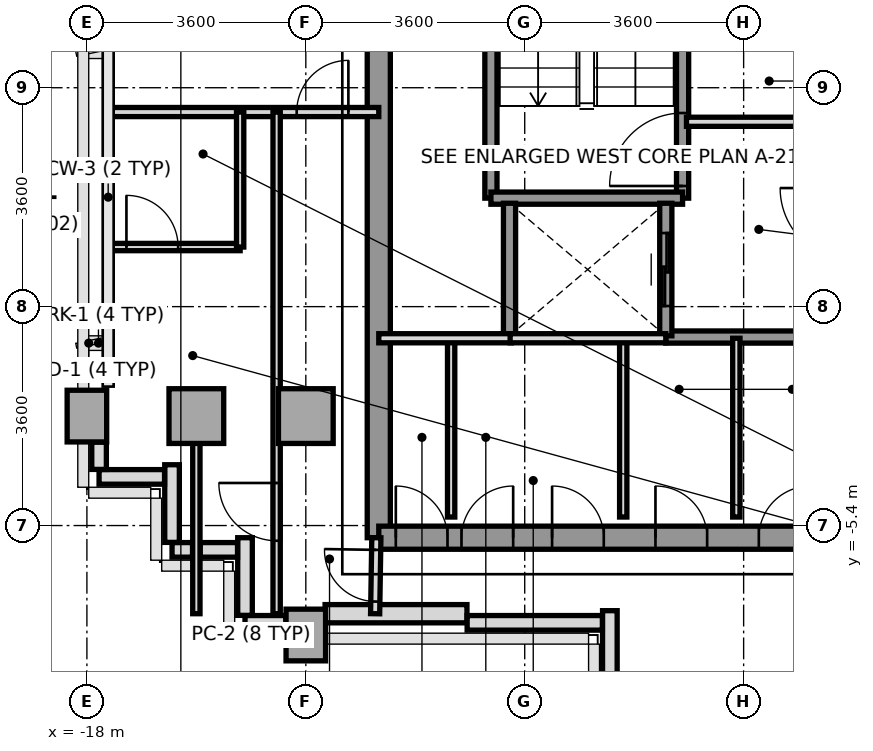
"""IFC4 building model, lengths in metres.
Left out: names, types, materials, properties, quantities, classifications, styles, units other than length and angle.
Written with IfcOpenShell. Run it as: python <this file> out.ifc"""

import sys

from ifc_helpers import new_model, si_unit, direction, frame, frame_2d, origin, origin_2d, place, context, subcontext, project, spatial, rectangle, extrude, source, transform, mapped, element, fill, save


model = new_model("IFC4")
c1 = context("Model", 3, precision=1e-05, world=origin(), true_north=direction((0.0, 1.0)))
c2 = subcontext(c1, "Body", "Model", "MODEL_VIEW")
j1 = project(units=[si_unit("LENGTHUNIT", "METRE"), si_unit("PLANEANGLEUNIT", "RADIAN")], contexts=[c1])
p1 = place(None, origin())
s1 = spatial("IfcSite", under=j1, at=p1, CompositionType="ELEMENT")
p2 = place(p1, origin())
s2 = spatial("IfcBuilding", under=s1, at=p2, CompositionType="ELEMENT")
p3 = place(p2, frame((0.0, 0.0, 191.0)))
s3 = spatial("IfcBuildingStorey", under=s2, at=p3, CompositionType="ELEMENT", Elevation=191.0)
m1 = source(origin(), c2, "Body", "SweptSolid", [
    extrude(rectangle(XDim=0.65, YDim=0.85, at=origin_2d()), origin(), (0.0, 0.0, 1.0), 3.2),
])
p4 = place(p3, frame((-18.0, -3.6, 0.0), z_axis=(0.0, 0.0, 1.0), x_axis=(1.0, 0.0, 0.0)))
e1 = element("IfcColumn", 1, at=p4, inside=s3, PredefinedType="COLUMN", context=c2, shape_type="MappedRepresentation", body=[
    mapped(m1, transform((0.0, 0.0, 0.0), x_axis=(1.0, 0.0, 0.0), y_axis=(0.0, 1.0, 0.0), z_axis=(0.0, 0.0, 1.0), scale=1.0)),
])
m2 = source(origin(), c2, "Body", "SweptSolid", [
    extrude(rectangle(XDim=0.9, YDim=0.9, at=origin_2d()), origin(), (0.0, 0.0, 1.0), 3.2),
])
p5 = place(p3, frame((-16.2, -3.6, 0.0), z_axis=(0.0, 0.0, 1.0), x_axis=(1.0, 0.0, 0.0)))
e2 = element("IfcColumn", 2, at=p5, inside=s3, PredefinedType="COLUMN", context=c2, shape_type="MappedRepresentation", body=[
    mapped(m2, transform((0.0, 0.0, 0.0), x_axis=(1.0, 0.0, 0.0), y_axis=(0.0, 1.0, 0.0), z_axis=(0.0, 0.0, 1.0), scale=1.0)),
])
p6 = place(p3, frame((-14.4, -7.2, 0.0), z_axis=(0.0, 0.0, 1.0), x_axis=(1.0, 0.0, 0.0)))
e3 = element("IfcColumn", 3, at=p6, inside=s3, PredefinedType="COLUMN", context=c2, shape_type="MappedRepresentation", body=[
    mapped(m1, transform((0.0, 0.0, 0.0), x_axis=(1.0, 0.0, 0.0), y_axis=(0.0, 1.0, 0.0), z_axis=(0.0, 0.0, 1.0), scale=1.0)),
])
p7 = place(p3, frame((-14.4, -3.6, 0.0), z_axis=(0.0, 0.0, 1.0), x_axis=(1.0, 0.0, 0.0)))
e4 = element("IfcColumn", 4, at=p7, inside=s3, PredefinedType="COLUMN", context=c2, shape_type="MappedRepresentation", body=[
    mapped(m2, transform((0.0, 0.0, 0.0), x_axis=(1.0, 0.0, 0.0), y_axis=(0.0, 1.0, 0.0), z_axis=(0.0, 0.0, 1.0), scale=1.0)),
])
p8 = place(p3, frame((-14.083, -6.85, 0.0), z_axis=(0.0, 0.0, 1.0), x_axis=(1.0, 0.0, 0.0)))
e5 = element("IfcWall", 5, at=p8, inside=s3, PredefinedType="SOLIDWALL", context=c2, shape_type="SweptSolid", body=[
    extrude(rectangle(XDim=2.333, YDim=0.3, at=frame_2d((1.167, 0.0))), origin(), (0.0, 0.0, 1.0), 3.2),
])
p9 = place(p3, frame((-9.4, -8.547, 0.0), z_axis=(0.0, 0.0, 1.0), x_axis=(0.0, 1.0, 0.0)))
e6 = element("IfcWall", 6, at=p9, inside=s3, PredefinedType="PARAPET", context=c2, shape_type="SweptSolid", body=[
    extrude(rectangle(XDim=1.747, YDim=0.24, at=frame_2d((0.874, 0.0))), origin(), (0.0, 0.0, 1.0), 1.15),
])
p10 = place(p3, frame((-9.523, -7.0, 0.0), z_axis=(0.0, 0.0, 1.0), x_axis=(-1.0, 0.0, 0.0)))
e7 = element("IfcWall", 7, at=p10, inside=s3, PredefinedType="PARAPET", context=c2, shape_type="SweptSolid", body=[
    extrude(rectangle(XDim=2.224, YDim=0.24, at=frame_2d((1.112, 0.0))), origin(), (0.0, 0.0, 1.0), 1.15),
])
p11 = place(p3, frame((-14.728, -7.0, 0.0), z_axis=(0.0, 0.0, 1.0), x_axis=(-1.0, 0.0, 0.0)))
e8 = element("IfcWall", 8, at=p11, inside=s3, PredefinedType="PARAPET", context=c2, shape_type="SweptSolid", body=[
    extrude(rectangle(XDim=0.672, YDim=0.24, at=frame_2d((0.336, 0.0))), origin(), (0.0, 0.0, 1.0), 1.15),
])
p12 = place(p3, frame((-15.4, -6.877, 0.0), z_axis=(0.0, 0.0, 1.0), x_axis=(0.0, 1.0, 0.0)))
e9 = element("IfcWall", 9, at=p12, inside=s3, PredefinedType="PARAPET", context=c2, shape_type="SweptSolid", body=[
    extrude(rectangle(XDim=1.277, YDim=0.24, at=frame_2d((0.638, 0.0))), origin(), (0.0, 0.0, 1.0), 1.15),
])
p13 = place(p3, frame((-15.523, -5.8, 0.0), z_axis=(0.0, 0.0, 1.0), x_axis=(-1.0, 0.0, 0.0)))
e10 = element("IfcWall", 10, at=p13, inside=s3, PredefinedType="PARAPET", context=c2, shape_type="SweptSolid", body=[
    extrude(rectangle(XDim=0.614, YDim=0.24, at=frame_2d((0.307, 0.0))), origin(), (0.0, 0.0, 1.0), 1.15),
])
p14 = place(p3, frame((-16.263, -5.8, 0.0), z_axis=(0.0, 0.0, 1.0), x_axis=(-1.0, 0.0, 0.0)))
e11 = element("IfcWall", 11, at=p14, inside=s3, PredefinedType="PARAPET", context=c2, shape_type="SweptSolid", body=[
    extrude(rectangle(XDim=0.337, YDim=0.24, at=frame_2d((0.168, 0.0))), origin(), (0.0, 0.0, 1.0), 1.15),
])
p15 = place(p3, frame((-16.6, -5.677, 0.0), z_axis=(0.0, 0.0, 1.0), x_axis=(0.0, 1.0, 0.0)))
e12 = element("IfcWall", 12, at=p15, inside=s3, PredefinedType="PARAPET", context=c2, shape_type="SweptSolid", body=[
    extrude(rectangle(XDim=1.277, YDim=0.24, at=frame_2d((0.639, 0.0))), origin(), (0.0, 0.0, 1.0), 1.15),
])
p16 = place(p3, frame((-16.723, -4.6, 0.0), z_axis=(0.0, 0.0, 1.0), x_axis=(-1.0, 0.0, 0.0)))
e13 = element("IfcWall", 13, at=p16, inside=s3, PredefinedType="PARAPET", context=c2, shape_type="SweptSolid", body=[
    extrude(rectangle(XDim=1.077, YDim=0.24, at=frame_2d((0.539, 0.0))), origin(), (0.0, 0.0, 1.0), 1.15),
])
p17 = place(p3, frame((-17.8, -4.477, 0.0), z_axis=(0.0, 0.0, 1.0), x_axis=(0.0, 1.0, 0.0)))
e14 = element("IfcWall", 14, at=p17, inside=s3, PredefinedType="PARAPET", context=c2, shape_type="SweptSolid", body=[
    extrude(rectangle(XDim=0.449, YDim=0.24, at=frame_2d((0.225, 0.0))), origin(), (0.0, 0.0, 1.0), 1.15),
])
p18 = place(p3, frame((-13.2, -5.6, 0.0), z_axis=(0.0, 0.0, 1.0), x_axis=(0.0, 1.0, 0.0)))
e15 = element("IfcWall", 15, at=p18, inside=s3, PredefinedType="SHEAR", context=c2, shape_type="SweptSolid", body=[
    extrude(rectangle(XDim=11.2, YDim=0.38, at=frame_2d((5.6, 0.0))), origin(), (0.0, 0.0, 1.0), 3.2),
])
p19 = place(p3, frame((-13.2, -5.6, 0.0), z_axis=(0.0, 0.0, 1.0), x_axis=(1.0, 0.0, 0.0)))
e16 = element("IfcWall", 16, at=p19, inside=s3, PredefinedType="SHEAR", context=c2, shape_type="SweptSolid", body=[
    extrude(rectangle(XDim=7.8, YDim=0.38, at=frame_2d((3.9, 0.0))), origin(), (0.0, 0.0, 1.0), 3.2),
])
p20 = place(p19, frame((0.28, 0.0, 0.0)))
e17 = element("IfcOpeningElement", 17, at=p20, cuts=e16, PredefinedType="OPENING", context=c2, shape_type="SweptSolid", body=[
    extrude(rectangle(XDim=0.85, YDim=2.1, at=frame_2d((0.425, 1.05))), frame((0.0, 0.2, 0.0), z_axis=(0.0, -1.0, 0.0), x_axis=(1.0, 0.0, 0.0)), (0.0, 0.0, 1.0), 0.4),
])
p21 = place(p19, frame((1.36, 0.0, 0.0)))
e18 = element("IfcOpeningElement", 18, at=p21, cuts=e16, PredefinedType="OPENING", context=c2, shape_type="SweptSolid", body=[
    extrude(rectangle(XDim=0.85, YDim=2.1, at=frame_2d((0.425, 1.05))), frame((0.0, 0.2, 0.0), z_axis=(0.0, -1.0, 0.0), x_axis=(1.0, 0.0, 0.0)), (0.0, 0.0, 1.0), 0.4),
])
p22 = place(p19, frame((2.85, 0.0, 0.0)))
e19 = element("IfcOpeningElement", 19, at=p22, cuts=e16, PredefinedType="OPENING", context=c2, shape_type="SweptSolid", body=[
    extrude(rectangle(XDim=0.85, YDim=2.1, at=frame_2d((0.425, 1.05))), frame((0.0, 0.2, 0.0), z_axis=(0.0, -1.0, 0.0), x_axis=(1.0, 0.0, 0.0)), (0.0, 0.0, 1.0), 0.4),
])
p23 = place(p19, frame((4.55, 0.0, 0.0)))
e20 = element("IfcOpeningElement", 20, at=p23, cuts=e16, PredefinedType="OPENING", context=c2, shape_type="SweptSolid", body=[
    extrude(rectangle(XDim=0.85, YDim=2.1, at=frame_2d((0.425, 1.05))), frame((0.0, 0.2, 0.0), z_axis=(0.0, -1.0, 0.0), x_axis=(1.0, 0.0, 0.0)), (0.0, 0.0, 1.0), 0.4),
])
p24 = place(p19, frame((6.25, 0.0, 0.0)))
e21 = element("IfcOpeningElement", 21, at=p24, cuts=e16, PredefinedType="OPENING", context=c2, shape_type="SweptSolid", body=[
    extrude(rectangle(XDim=0.85, YDim=2.1, at=frame_2d((0.425, 1.05))), frame((0.0, 0.2, 0.0), z_axis=(0.0, -1.0, 0.0), x_axis=(1.0, 0.0, 0.0)), (0.0, 0.0, 1.0), 0.4),
])
p25 = place(p3, frame((-8.48, -2.3, 0.0), z_axis=(0.0, 0.0, 1.0), x_axis=(1.0, 0.0, 0.0)))
e22 = element("IfcWall", 22, at=p25, inside=s3, PredefinedType="SOLIDWALL", context=c2, shape_type="SweptSolid", body=[
    extrude(rectangle(XDim=3.08, YDim=0.2, at=frame_2d((1.54, 0.0))), origin(), (0.0, 0.0, 1.0), 3.2),
])
p26 = place(p3, frame((-8.204, -0.016, 0.0), z_axis=(0.0, 0.0, 1.0), x_axis=(0.0, 1.0, 0.0)))
e23 = element("IfcWall", 23, at=p26, inside=s3, PredefinedType="SOLIDWALL", context=c2, shape_type="SweptSolid", body=[
    extrude(rectangle(XDim=6.916, YDim=0.2, at=frame_2d((3.458, 0.0))), origin(), (0.0, 0.0, 1.0), 3.2),
])
p27 = place(p26, frame((0.2, 0.0, 0.0)))
e24 = element("IfcOpeningElement", 24, at=p27, cuts=e23, PredefinedType="OPENING", context=c2, shape_type="SweptSolid", body=[
    extrude(rectangle(XDim=1.2, YDim=2.2, at=frame_2d((0.6, 1.1))), frame((0.0, 0.11, 0.0), z_axis=(0.0, -1.0, 0.0), x_axis=(1.0, 0.0, 0.0)), (0.0, 0.0, 1.0), 0.22),
])
p28 = place(p3, frame((-11.356, -0.016, 0.0), z_axis=(0.0, 0.0, 1.0), x_axis=(0.0, 1.0, 0.0)))
e25 = element("IfcWall", 25, at=p28, inside=s3, PredefinedType="SOLIDWALL", context=c2, shape_type="SweptSolid", body=[
    extrude(rectangle(XDim=6.916, YDim=0.2, at=frame_2d((3.458, 0.0))), origin(), (0.0, 0.0, 1.0), 3.2),
])
p29 = place(p3, frame((-11.356, -0.016, 0.0), z_axis=(0.0, 0.0, 1.0), x_axis=(1.0, 0.0, 0.0)))
e26 = element("IfcWall", 26, at=p29, inside=s3, PredefinedType="SOLIDWALL", context=c2, shape_type="SweptSolid", body=[
    extrude(rectangle(XDim=3.152, YDim=0.2, at=frame_2d((1.576, 0.0))), origin(), (0.0, 0.0, 1.0), 3.2),
])
p30 = place(p3, frame((-11.05, -2.28, 0.0), z_axis=(0.0, 0.0, 1.0), x_axis=(0.0, 1.0, 0.0)))
e27 = element("IfcWall", 27, at=p30, inside=s3, PredefinedType="SOLIDWALL", context=c2, shape_type="SweptSolid", body=[
    extrude(rectangle(XDim=2.18, YDim=0.2, at=frame_2d((1.09, 0.0))), origin(), (0.0, 0.0, 1.0), 3.2),
])
p31 = place(p3, frame((-8.48, -2.28, 0.0), z_axis=(0.0, 0.0, 1.0), x_axis=(0.0, 1.0, 0.0)))
e28 = element("IfcWall", 28, at=p31, inside=s3, PredefinedType="SOLIDWALL", context=c2, shape_type="SweptSolid", body=[
    extrude(rectangle(XDim=2.18, YDim=0.2, at=frame_2d((1.09, 0.0))), origin(), (0.0, 0.0, 1.0), 3.2),
])
p32 = place(p31, frame((0.49, 0.0, 0.0)))
e29 = element("IfcOpeningElement", 29, at=p32, cuts=e28, PredefinedType="OPENING", context=c2, shape_type="SweptSolid", body=[
    extrude(rectangle(XDim=1.2, YDim=2.2, at=frame_2d((0.6, 1.1))), frame((0.0, 0.11, 0.0), z_axis=(0.0, -1.0, 0.0), x_axis=(1.0, 0.0, 0.0)), (0.0, 0.0, 1.0), 0.22),
])
p33 = place(p3, frame((-8.14, 1.24, 0.0), z_axis=(0.0, 0.0, 1.0), x_axis=(1.0, 0.0, 0.0)))
e30 = element("IfcWall", 30, at=p33, inside=s3, PredefinedType="PARTITIONING", context=c2, shape_type="SweptSolid", body=[
    extrude(rectangle(XDim=2.39, YDim=0.15, at=frame_2d((1.195, 0.0))), origin(), (0.0, 0.0, 1.0), 2.3),
])
p34 = place(p3, frame((-12.01, -5.26, 0.0), z_axis=(0.0, 0.0, 1.0), x_axis=(0.0, 1.0, 0.0)))
e31 = element("IfcWall", 31, at=p34, inside=s3, PredefinedType="PARTITIONING", context=c2, shape_type="SweptSolid", body=[
    extrude(rectangle(XDim=2.94, YDim=0.12, at=frame_2d((1.47, 0.0))), origin(), (0.0, 0.0, 1.0), 3.2),
])
p35 = place(p3, frame((-13.2, -2.32, 0.0), z_axis=(0.0, 0.0, 1.0), x_axis=(1.0, 0.0, 0.0)))
e32 = element("IfcWall", 32, at=p35, inside=s3, PredefinedType="PARTITIONING", context=c2, shape_type="SweptSolid", body=[
    extrude(rectangle(XDim=2.18, YDim=0.15, at=frame_2d((1.09, 0.0))), origin(), (0.0, 0.0, 1.0), 3.2),
])
for number, where, z_axis, x_axis in (
    (33, (-9.18, -5.26, 0.0), (0.0, 0.0, 1.0), (0.0, 1.0, 0.0)),
    (34, (-7.32, -5.26, 0.0), (0.0, 0.0, 1.0), (0.0, 1.0, 0.0)),
):
    element("IfcWall", number, at=place(p3, frame(where, z_axis=z_axis, x_axis=x_axis)), inside=s3, PredefinedType="PARTITIONING", context=c2, shape_type="SweptSolid", body=[
        extrude(rectangle(XDim=2.94, YDim=0.12, at=frame_2d((1.47, 0.0))), origin(), (0.0, 0.0, 1.0), 3.2),
    ])
p36 = place(p3, frame((-11.04, -2.32, 0.0), z_axis=(0.0, 0.0, 1.0), x_axis=(1.0, 0.0, 0.0)))
e35 = element("IfcWall", 35, at=p36, inside=s3, PredefinedType="PARTITIONING", context=c2, shape_type="SweptSolid", body=[
    extrude(rectangle(XDim=2.56, YDim=0.15, at=frame_2d((1.28, 0.0))), origin(), (0.0, 0.0, 1.0), 3.2),
])
p37 = place(p3, frame((-13.26, -6.85, 0.0), z_axis=(0.0, 0.0, 1.0), x_axis=(0.016013571389, 0.999871774545, 0.0)))
e36 = element("IfcWall", 36, at=p37, inside=s3, PredefinedType="PARTITIONING", context=c2, shape_type="SweptSolid", body=[
    extrude(rectangle(XDim=1.25, YDim=0.15, at=frame_2d((0.625, 0.0))), origin(), (0.0, 0.0, 1.0), 3.2),
])
p38 = place(p37, frame((0.2, 0.0, 0.0)))
e37 = element("IfcOpeningElement", 37, at=p38, cuts=e36, PredefinedType="OPENING", context=c2, shape_type="SweptSolid", body=[
    extrude(rectangle(XDim=0.85, YDim=2.1, at=frame_2d((0.425, 1.05))), frame((0.0, 0.085, 0.0), z_axis=(0.0, -1.0, 0.0), x_axis=(1.0, 0.0, 0.0)), (0.0, 0.0, 1.0), 0.17),
])
p39 = place(p3, frame((-17.65, 1.4, 0.0), z_axis=(0.0, 0.0, 1.0), x_axis=(1.0, 0.0, 0.0)))
e38 = element("IfcWall", 38, at=p39, inside=s3, PredefinedType="PARTITIONING", context=c2, shape_type="SweptSolid", body=[
    extrude(rectangle(XDim=4.45, YDim=0.15, at=frame_2d((2.225, 0.0))), origin(), (0.0, 0.0, 1.0), 2.8),
])
p40 = place(p39, frame((3.1, 0.0, 0.0)))
e39 = element("IfcOpeningElement", 39, at=p40, cuts=e38, PredefinedType="OPENING", context=c2, shape_type="SweptSolid", body=[
    extrude(rectangle(XDim=0.85, YDim=2.1, at=frame_2d((0.425, 1.05))), frame((0.0, 0.085, 0.0), z_axis=(0.0, -1.0, 0.0), x_axis=(1.0, 0.0, 0.0)), (0.0, 0.0, 1.0), 0.17),
])
p41 = place(p3, frame((-16.2, -6.85, 0.0), z_axis=(0.0, 0.0, 1.0), x_axis=(0.0, 1.0, 0.0)))
e40 = element("IfcWall", 40, at=p41, inside=s3, PredefinedType="PARTITIONING", context=c2, shape_type="SweptSolid", body=[
    extrude(rectangle(XDim=3.25, YDim=0.12, at=frame_2d((1.625, 0.0))), origin(), (0.0, 0.0, 1.0), 3.2),
])
p42 = place(p3, frame((-14.88, -6.85, 0.0), z_axis=(0.0, 0.0, 1.0), x_axis=(0.0, 1.0, 0.0)))
e41 = element("IfcWall", 41, at=p42, inside=s3, PredefinedType="PARTITIONING", context=c2, shape_type="SweptSolid", body=[
    extrude(rectangle(XDim=8.25, YDim=0.12, at=frame_2d((4.125, 0.0))), origin(), (0.0, 0.0, 1.0), 3.2),
])
p43 = place(p42, frame((1.2, 0.0, 0.0)))
e42 = element("IfcOpeningElement", 42, at=p43, cuts=e41, PredefinedType="OPENING", context=c2, shape_type="SweptSolid", body=[
    extrude(rectangle(XDim=0.95, YDim=2.15, at=frame_2d((0.475, 1.075))), frame((0.0, 0.07, 0.0), z_axis=(0.0, -1.0, 0.0), x_axis=(1.0, 0.0, 0.0)), (0.0, 0.0, 1.0), 0.14),
])
p44 = place(p3, frame((-17.65, -0.82, 0.0), z_axis=(0.0, 0.0, 1.0), x_axis=(1.0, 0.0, 0.0)))
e43 = element("IfcWall", 43, at=p44, inside=s3, PredefinedType="PARTITIONING", context=c2, shape_type="SweptSolid", body=[
    extrude(rectangle(XDim=2.17, YDim=0.12, at=frame_2d((1.085, 0.0))), origin(), (0.0, 0.0, 1.0), 2.8),
])
p45 = place(p44, frame((0.3, 0.0, 0.0)))
e44 = element("IfcOpeningElement", 44, at=p45, cuts=e43, PredefinedType="OPENING", context=c2, shape_type="SweptSolid", body=[
    extrude(rectangle(XDim=0.85, YDim=2.1, at=frame_2d((0.425, 1.05))), frame((0.0, 0.07, 0.0), z_axis=(0.0, -1.0, 0.0), x_axis=(1.0, 0.0, 0.0)), (0.0, 0.0, 1.0), 0.14),
])
p46 = place(p3, frame((-15.48, -0.82, 0.0), z_axis=(0.0, 0.0, 1.0), x_axis=(0.0, 1.0, 0.0)))
e45 = element("IfcWall", 45, at=p46, inside=s3, PredefinedType="PARTITIONING", context=c2, shape_type="SweptSolid", body=[
    extrude(rectangle(XDim=2.22, YDim=0.12, at=frame_2d((1.11, 0.0))), origin(), (0.0, 0.0, 1.0), 3.2),
])
m3 = source(origin(), c2, "Body", "SweptSolid", [
    extrude(rectangle(XDim=1.2, YDim=2.2, at=frame_2d((0.6, 1.1))), frame((0.0, 0.025, 0.0), z_axis=(0.0, -1.0, 0.0), x_axis=(1.0, 0.0, 0.0)), (0.0, 0.0, 1.0), 0.05),
])
p47 = place(p27, origin())
e46 = element("IfcDoor", 46, at=p47, inside=s3, OperationType="SINGLE_SWING_LEFT", PredefinedType="DOOR", context=c2, shape_type="MappedRepresentation", body=[
    mapped(m3, transform((0.0, 0.0, 0.0), x_axis=(1.0, 0.0, 0.0), y_axis=(0.0, 1.0, 0.0), z_axis=(0.0, 0.0, 1.0), scale=1.0)),
])
fill(e24, e46)
m4 = source(origin(), c2, "Body", "SweptSolid", [
    extrude(rectangle(XDim=0.85, YDim=2.1, at=frame_2d((0.425, 1.05))), frame((0.0, 0.025, 0.0), z_axis=(0.0, -1.0, 0.0), x_axis=(1.0, 0.0, 0.0)), (0.0, 0.0, 1.0), 0.05),
])
p48 = place(p20, origin())
e47 = element("IfcDoor", 47, at=p48, inside=s3, OperationType="SINGLE_SWING_LEFT", PredefinedType="DOOR", context=c2, shape_type="MappedRepresentation", body=[
    mapped(m4, transform((0.0, 0.0, 0.0), x_axis=(1.0, 0.0, 0.0), y_axis=(0.0, 1.0, 0.0), z_axis=(0.0, 0.0, 1.0), scale=1.0)),
])
fill(e17, e47)
p49 = place(p21, origin())
e48 = element("IfcDoor", 48, at=p49, inside=s3, OperationType="SINGLE_SWING_RIGHT", PredefinedType="DOOR", context=c2, shape_type="MappedRepresentation", body=[
    mapped(m4, transform((0.0, 0.0, 0.0), x_axis=(1.0, 0.0, 0.0), y_axis=(0.0, 1.0, 0.0), z_axis=(0.0, 0.0, 1.0), scale=1.0)),
])
fill(e18, e48)
p50 = place(p22, origin())
e49 = element("IfcDoor", 49, at=p50, inside=s3, OperationType="SINGLE_SWING_LEFT", PredefinedType="DOOR", context=c2, shape_type="MappedRepresentation", body=[
    mapped(m4, transform((0.0, 0.0, 0.0), x_axis=(1.0, 0.0, 0.0), y_axis=(0.0, 1.0, 0.0), z_axis=(0.0, 0.0, 1.0), scale=1.0)),
])
fill(e19, e49)
p51 = place(p23, origin())
e50 = element("IfcDoor", 50, at=p51, inside=s3, OperationType="SINGLE_SWING_LEFT", PredefinedType="DOOR", context=c2, shape_type="MappedRepresentation", body=[
    mapped(m4, transform((0.0, 0.0, 0.0), x_axis=(1.0, 0.0, 0.0), y_axis=(0.0, 1.0, 0.0), z_axis=(0.0, 0.0, 1.0), scale=1.0)),
])
fill(e20, e50)
p52 = place(p24, origin())
e51 = element("IfcDoor", 51, at=p52, inside=s3, OperationType="SINGLE_SWING_RIGHT", PredefinedType="DOOR", context=c2, shape_type="MappedRepresentation", body=[
    mapped(m4, transform((0.0, 0.0, 0.0), x_axis=(1.0, 0.0, 0.0), y_axis=(0.0, 1.0, 0.0), z_axis=(0.0, 0.0, 1.0), scale=1.0)),
])
fill(e21, e51)
p53 = place(p32, origin())
e52 = element("IfcDoor", 52, at=p53, inside=s3, OperationType="SLIDING_TO_RIGHT", PredefinedType="DOOR", context=c2, shape_type="MappedRepresentation", body=[
    mapped(m3, transform((0.0, 0.0, 0.0), x_axis=(1.0, 0.0, 0.0), y_axis=(0.0, 1.0, 0.0), z_axis=(0.0, 0.0, 1.0), scale=1.0)),
])
fill(e29, e52)
p54 = place(p38, origin())
e53 = element("IfcDoor", 53, at=p54, inside=s3, OperationType="SINGLE_SWING_RIGHT", PredefinedType="DOOR", context=c2, shape_type="MappedRepresentation", body=[
    mapped(m4, transform((0.0, 0.0, 0.0), x_axis=(1.0, 0.0, 0.0), y_axis=(0.0, 1.0, 0.0), z_axis=(0.0, 0.0, 1.0), scale=1.0)),
])
fill(e37, e53)
p55 = place(p45, origin())
e54 = element("IfcDoor", 54, at=p55, inside=s3, OperationType="SINGLE_SWING_LEFT", PredefinedType="DOOR", context=c2, shape_type="MappedRepresentation", body=[
    mapped(m4, transform((0.0, 0.0, 0.0), x_axis=(1.0, 0.0, 0.0), y_axis=(0.0, 1.0, 0.0), z_axis=(0.0, 0.0, 1.0), scale=1.0)),
])
fill(e44, e54)
m5 = source(origin(), c2, "Body", "SweptSolid", [
    extrude(rectangle(XDim=0.95, YDim=2.15, at=frame_2d((0.475, 1.075))), frame((0.0, 0.025, 0.0), z_axis=(0.0, -1.0, 0.0), x_axis=(1.0, 0.0, 0.0)), (0.0, 0.0, 1.0), 0.05),
])
p56 = place(p43, origin())
e55 = element("IfcDoor", 55, at=p56, inside=s3, OperationType="SINGLE_SWING_RIGHT", PredefinedType="DOOR", context=c2, shape_type="MappedRepresentation", body=[
    mapped(m5, transform((0.0, 0.0, 0.0), x_axis=(1.0, 0.0, 0.0), y_axis=(0.0, 1.0, 0.0), z_axis=(0.0, 0.0, 1.0), scale=1.0)),
])
fill(e42, e55)
p57 = place(p40, origin())
e56 = element("IfcDoor", 56, at=p57, inside=s3, OperationType="SINGLE_SWING_RIGHT", PredefinedType="DOOR", context=c2, shape_type="MappedRepresentation", body=[
    mapped(m4, transform((0.0, 0.0, 0.0), x_axis=(1.0, 0.0, 0.0), y_axis=(0.0, 1.0, 0.0), z_axis=(0.0, 0.0, 1.0), scale=1.0)),
])
fill(e39, e56)
save(model, sys.argv[1])
